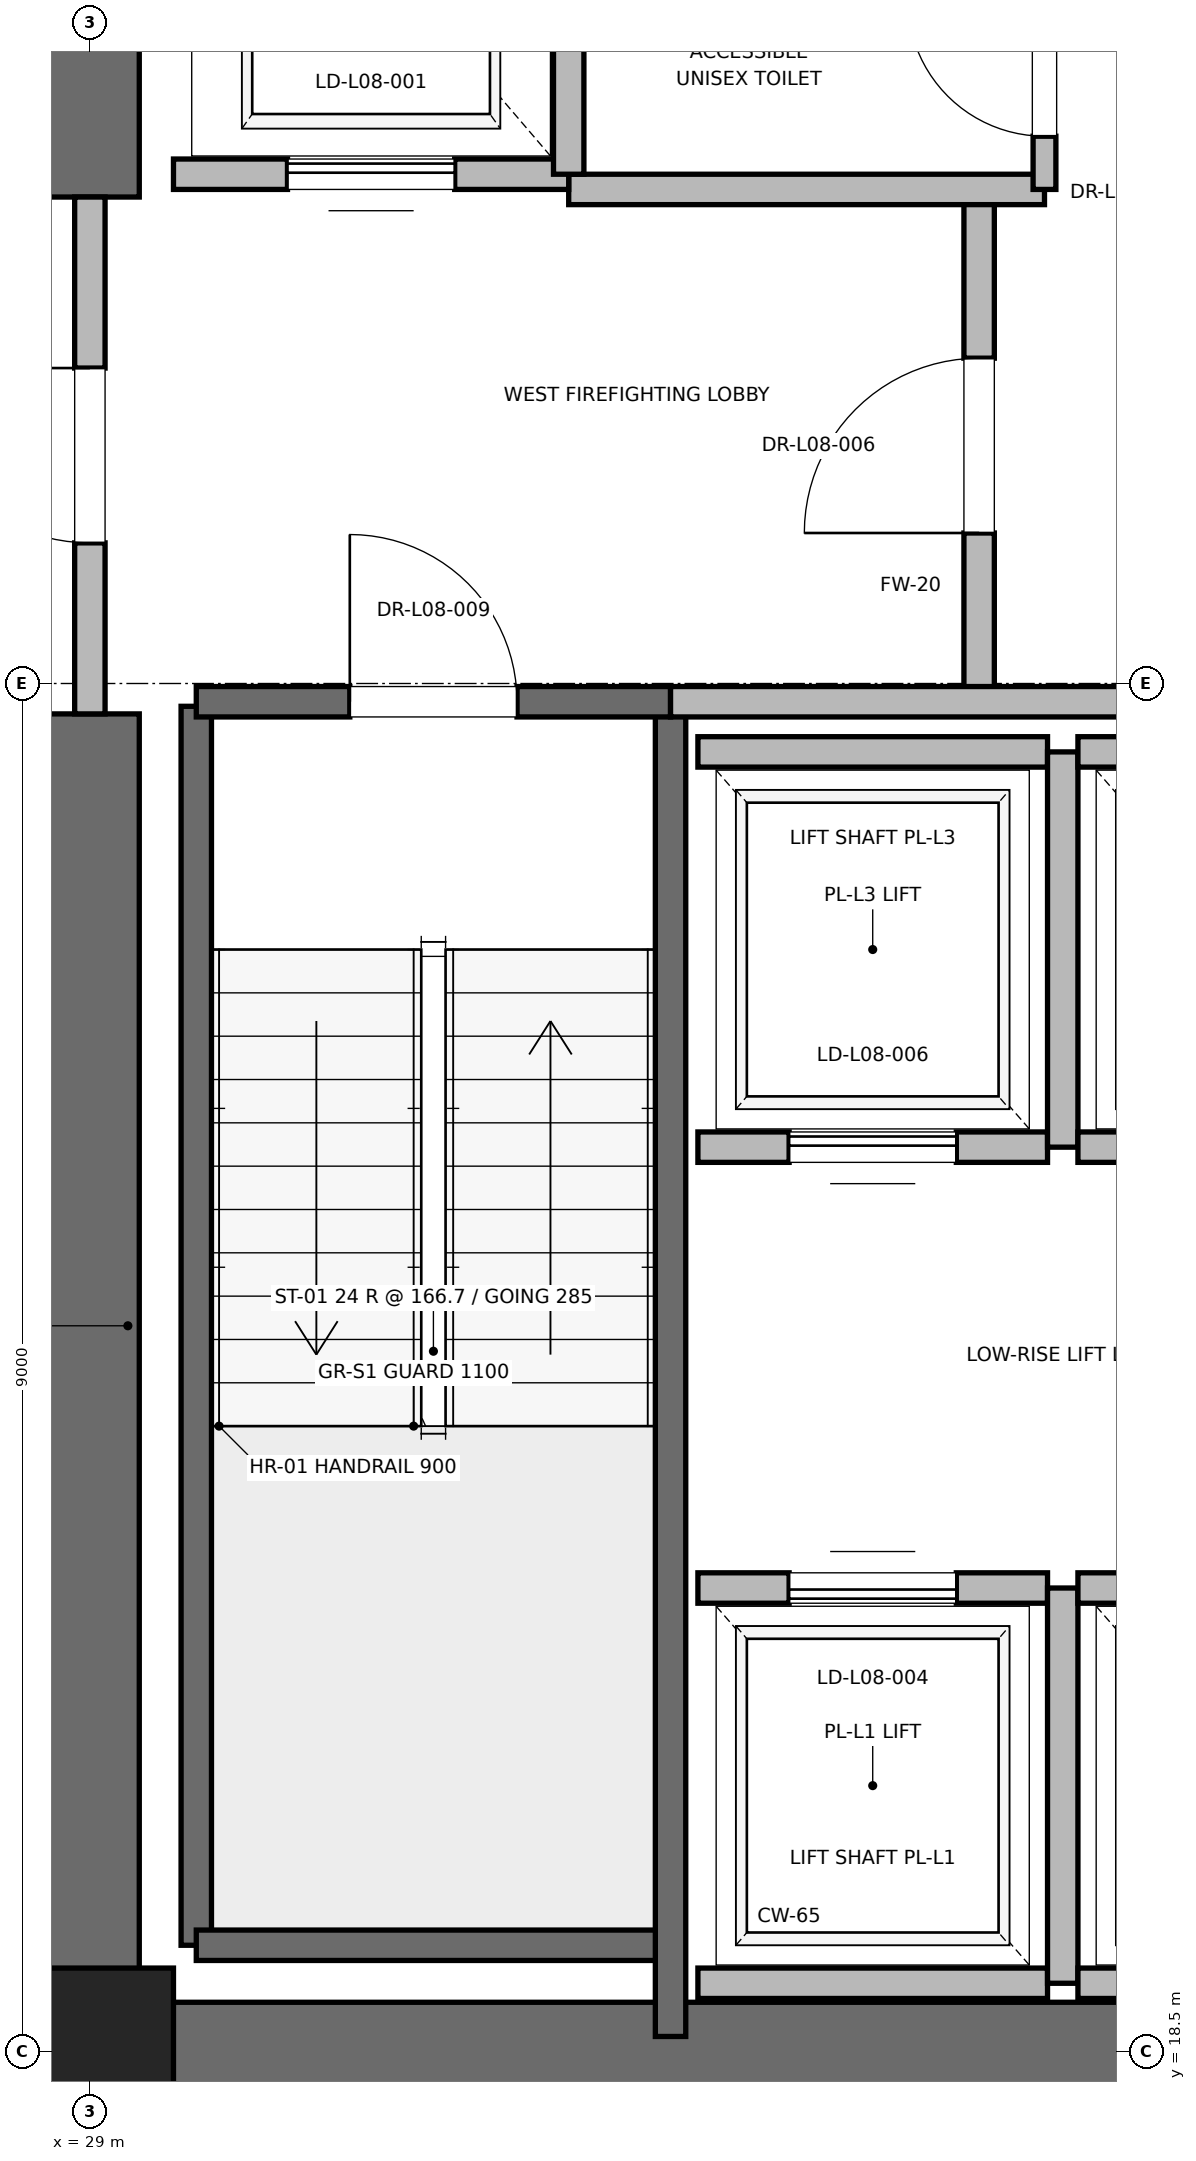
"""IFC4 building model, lengths in metres.
Left out: names, types, materials, properties, quantities, classifications, styles, units other than length and angle.
Written with IfcOpenShell. Run it as: python <this file> out.ifc"""

import sys

from ifc_helpers import new_model, si_unit, direction, frame, frame_2d, origin, origin_2d, place, context, subcontext, project, spatial, rectangle, extrude, element, fill, save


model = new_model("IFC4")
c1 = context("Model", 3, precision=1e-05, world=origin(), true_north=direction((0.0, 1.0)))
c2 = subcontext(c1, "Body", "Model", "MODEL_VIEW")
j1 = project(units=[si_unit("LENGTHUNIT", "METRE"), si_unit("PLANEANGLEUNIT", "RADIAN")], contexts=[c1])
p1 = place(None, origin())
s1 = spatial("IfcSite", under=j1, at=p1, CompositionType="ELEMENT")
p2 = place(p1, origin())
s2 = spatial("IfcBuilding", under=s1, at=p2, CompositionType="ELEMENT")
p3 = place(p2, frame((0.0, 0.0, 39.6)))
s3 = spatial("IfcBuildingStorey", under=s2, at=p3, CompositionType="ELEMENT", Elevation=39.6)
p4 = place(p3, frame((29.0, 18.5, 0.0), z_axis=(0.0, 0.0, 1.0), x_axis=(1.0, 0.0, 0.0)))
e1 = element("IfcColumn", 1, at=p4, inside=s3, PredefinedType="PILASTER", context=c2, shape_type="SweptSolid", body=[
    extrude(rectangle(XDim=1.1, YDim=1.1, at=origin_2d()), origin(), (0.0, 0.0, 1.0), 4.0),
])
p5 = place(p3, frame((29.0, 18.5, 0.0), z_axis=(0.0, 0.0, 1.0), x_axis=(1.0, 0.0, 0.0)))
e2 = element("IfcWall", 2, at=p5, inside=s3, PredefinedType="SHEAR", context=c2, shape_type="SweptSolid", body=[
    extrude(rectangle(XDim=9.2, YDim=0.65, at=frame_2d((4.6, 0.0))), origin(), (0.0, 0.0, 1.0), 3.76),
])
p6 = place(p3, frame((29.0, 18.5, 0.0), z_axis=(0.0, 0.0, 1.0), x_axis=(0.0, 1.0, 0.0)))
e3 = element("IfcWall", 3, at=p6, inside=s3, PredefinedType="SHEAR", context=c2, shape_type="SweptSolid", body=[
    extrude(rectangle(XDim=8.8, YDim=0.65, at=frame_2d((4.4, 0.0))), origin(), (0.0, 0.0, 1.0), 3.76),
])
p7 = place(p3, frame((29.0, 30.7, 0.0), z_axis=(0.0, 0.0, 1.0), x_axis=(0.0, 1.0, 0.0)))
e4 = element("IfcWall", 4, at=p7, inside=s3, PredefinedType="SHEAR", context=c2, shape_type="SweptSolid", body=[
    extrude(rectangle(XDim=5.8, YDim=0.65, at=frame_2d((2.9, 0.0))), origin(), (0.0, 0.0, 1.0), 3.76),
])
p8 = place(p3, frame((29.7, 19.2, 0.0), z_axis=(0.0, 0.0, 1.0), x_axis=(0.0, 1.0, 0.0)))
e5 = element("IfcWall", 5, at=p8, inside=s3, PredefinedType="SOLIDWALL", context=c2, shape_type="SweptSolid", body=[
    extrude(rectangle(XDim=8.15, YDim=0.2, at=frame_2d((4.075, 0.0))), origin(), (0.0, 0.0, 1.0), 3.76),
])
p9 = place(p3, frame((29.7, 19.2, 0.0), z_axis=(0.0, 0.0, 1.0), x_axis=(1.0, 0.0, 0.0)))
e6 = element("IfcWall", 6, at=p9, inside=s3, PredefinedType="SOLIDWALL", context=c2, shape_type="SweptSolid", body=[
    extrude(rectangle(XDim=3.12, YDim=0.2, at=frame_2d((1.56, 0.0))), origin(), (0.0, 0.0, 1.0), 3.76),
])
p10 = place(p3, frame((32.82, 18.6, 0.0), z_axis=(0.0, 0.0, 1.0), x_axis=(0.0, 1.0, 0.0)))
e7 = element("IfcWall", 7, at=p10, inside=s3, PredefinedType="SOLIDWALL", context=c2, shape_type="SweptSolid", body=[
    extrude(rectangle(XDim=8.78, YDim=0.2, at=frame_2d((4.39, 0.0))), origin(), (0.0, 0.0, 1.0), 3.76),
])
p11 = place(p3, frame((29.7, 27.38, 0.0), z_axis=(0.0, 0.0, 1.0), x_axis=(1.0, 0.0, 0.0)))
e8 = element("IfcWall", 8, at=p11, inside=s3, PredefinedType="SOLIDWALL", context=c2, shape_type="SweptSolid", body=[
    extrude(rectangle(XDim=3.12, YDim=0.2, at=frame_2d((1.56, 0.0))), origin(), (0.0, 0.0, 1.0), 3.76),
])
p12 = place(p11, frame((1.01, 0.0, 0.0)))
e9 = element("IfcOpeningElement", 9, at=p12, cuts=e8, PredefinedType="OPENING", context=c2, shape_type="SweptSolid", body=[
    extrude(rectangle(XDim=1.1, YDim=2.15, at=frame_2d((0.55, 1.075))), frame((0.0, 0.1, 0.0), z_axis=(0.0, -1.0, 0.0), x_axis=(1.0, 0.0, 0.0)), (0.0, 0.0, 1.0), 0.2),
])
p13 = place(p3, frame((34.85, 27.38, 0.0), z_axis=(0.0, 0.0, 1.0), x_axis=(0.0, 1.0, 0.0)))
e10 = element("IfcWall", 10, at=p13, inside=s3, PredefinedType="PARTITIONING", context=c2, shape_type="SweptSolid", body=[
    extrude(rectangle(XDim=3.37, YDim=0.2, at=frame_2d((1.685, 0.0))), origin(), (0.0, 0.0, 1.0), 3.76),
])
p14 = place(p13, frame((1.11, 0.0, 0.0)))
e11 = element("IfcOpeningElement", 11, at=p14, cuts=e10, PredefinedType="OPENING", context=c2, shape_type="SweptSolid", body=[
    extrude(rectangle(XDim=1.15, YDim=2.2, at=frame_2d((0.575, 1.1))), frame((0.0, 0.1, 0.0), z_axis=(0.0, -1.0, 0.0), x_axis=(1.0, 0.0, 0.0)), (0.0, 0.0, 1.0), 0.2),
])
p15 = place(p3, frame((29.0, 27.3, 0.0), z_axis=(0.0, 0.0, 1.0), x_axis=(0.0, 1.0, 0.0)))
e12 = element("IfcWall", 12, at=p15, inside=s3, PredefinedType="PARTITIONING", context=c2, shape_type="SweptSolid", body=[
    extrude(rectangle(XDim=3.4, YDim=0.2, at=frame_2d((1.7, 0.0))), origin(), (0.0, 0.0, 1.0), 2.54),
])
p16 = place(p15, frame((1.125, 0.0, 0.0)))
e13 = element("IfcOpeningElement", 13, at=p16, cuts=e12, PredefinedType="OPENING", context=c2, shape_type="SweptSolid", body=[
    extrude(rectangle(XDim=1.15, YDim=2.2, at=frame_2d((0.575, 1.1))), frame((0.0, 0.1, 0.0), z_axis=(0.0, -1.0, 0.0), x_axis=(1.0, 0.0, 0.0)), (0.0, 0.0, 1.0), 0.2),
])
p17 = place(p3, frame((32.82, 27.38, 0.0), z_axis=(0.0, 0.0, 1.0), x_axis=(1.0, 0.0, 0.0)))
e14 = element("IfcWall", 14, at=p17, inside=s3, PredefinedType="PARTITIONING", context=c2, shape_type="SweptSolid", body=[
    extrude(rectangle(XDim=5.62, YDim=0.2, at=frame_2d((2.81, 0.0))), origin(), (0.0, 0.0, 1.0), 3.76),
])
p18 = place(p3, frame((32.15, 30.75, 0.0), z_axis=(0.0, 0.0, 1.0), x_axis=(1.0, 0.0, 0.0)))
e15 = element("IfcWall", 15, at=p18, inside=s3, PredefinedType="PARTITIONING", context=c2, shape_type="SweptSolid", body=[
    extrude(rectangle(XDim=3.13, YDim=0.2, at=frame_2d((1.565, 0.0))), origin(), (0.0, 0.0, 1.0), 3.76),
])
p19 = place(p3, frame((29.55, 30.85, 0.0), z_axis=(0.0, 0.0, 1.0), x_axis=(1.0, 0.0, 0.0)))
e16 = element("IfcWall", 16, at=p19, inside=s3, PredefinedType="SOLIDWALL", context=c2, shape_type="SweptSolid", body=[
    extrude(rectangle(XDim=2.6, YDim=0.2, at=frame_2d((1.3, 0.0))), origin(), (0.0, 0.0, 1.0), 2.54),
])
p20 = place(p19, frame((0.75, 0.0, 0.0)))
e17 = element("IfcOpeningElement", 17, at=p20, cuts=e16, PredefinedType="OPENING", context=c2, shape_type="SweptSolid", body=[
    extrude(rectangle(XDim=1.1, YDim=2.2, at=frame_2d((0.55, 1.1))), frame((0.0, 0.1, 0.0), z_axis=(0.0, -1.0, 0.0), x_axis=(1.0, 0.0, 0.0)), (0.0, 0.0, 1.0), 0.2),
])
p21 = place(p3, frame((32.15, 30.85, 0.0), z_axis=(0.0, 0.0, 1.0), x_axis=(0.0, 1.0, 0.0)))
e18 = element("IfcWall", 18, at=p21, inside=s3, PredefinedType="SOLIDWALL", context=c2, shape_type="SweptSolid", body=[
    extrude(rectangle(XDim=3.0, YDim=0.2, at=frame_2d((1.5, 0.0))), origin(), (0.0, 0.0, 1.0), 3.76),
])
p22 = place(p3, frame((33.0, 18.95, 0.0), z_axis=(0.0, 0.0, 1.0), x_axis=(1.0, 0.0, 0.0)))
e19 = element("IfcWall", 19, at=p22, inside=s3, PredefinedType="SOLIDWALL", context=c2, shape_type="SweptSolid", body=[
    extrude(rectangle(XDim=2.3, YDim=0.2, at=frame_2d((1.15, 0.0))), origin(), (0.0, 0.0, 1.0), 3.76),
])
p23 = place(p3, frame((35.3, 21.55, 0.0), z_axis=(0.0, 0.0, 1.0), x_axis=(-1.0, 0.0, 0.0)))
e20 = element("IfcWall", 20, at=p23, inside=s3, PredefinedType="SOLIDWALL", context=c2, shape_type="SweptSolid", body=[
    extrude(rectangle(XDim=2.3, YDim=0.2, at=frame_2d((1.15, 0.0))), origin(), (0.0, 0.0, 1.0), 3.76),
])
p24 = place(p23, frame((0.6, 0.0, 0.0)))
e21 = element("IfcOpeningElement", 21, at=p24, cuts=e20, PredefinedType="OPENING", context=c2, shape_type="SweptSolid", body=[
    extrude(rectangle(XDim=1.1, YDim=2.2, at=frame_2d((0.55, 1.1))), frame((0.0, 0.1, 0.0), z_axis=(0.0, -1.0, 0.0), x_axis=(1.0, 0.0, 0.0)), (0.0, 0.0, 1.0), 0.2),
])
p25 = place(p3, frame((35.4, 18.95, 0.0), z_axis=(0.0, 0.0, 1.0), x_axis=(0.0, 1.0, 0.0)))
e22 = element("IfcWall", 22, at=p25, inside=s3, PredefinedType="SOLIDWALL", context=c2, shape_type="SweptSolid", body=[
    extrude(rectangle(XDim=2.6, YDim=0.2, at=frame_2d((1.3, 0.0))), origin(), (0.0, 0.0, 1.0), 3.76),
])
p26 = place(p3, frame((35.5, 18.95, 0.0), z_axis=(0.0, 0.0, 1.0), x_axis=(1.0, 0.0, 0.0)))
e23 = element("IfcWall", 23, at=p26, inside=s3, PredefinedType="SOLIDWALL", context=c2, shape_type="SweptSolid", body=[
    extrude(rectangle(XDim=2.3, YDim=0.2, at=frame_2d((1.15, 0.0))), origin(), (0.0, 0.0, 1.0), 2.54),
])
p27 = place(p3, frame((37.8, 21.55, 0.0), z_axis=(0.0, 0.0, 1.0), x_axis=(-1.0, 0.0, 0.0)))
e24 = element("IfcWall", 24, at=p27, inside=s3, PredefinedType="SOLIDWALL", context=c2, shape_type="SweptSolid", body=[
    extrude(rectangle(XDim=2.3, YDim=0.2, at=frame_2d((1.15, 0.0))), origin(), (0.0, 0.0, 1.0), 3.76),
])
p28 = place(p27, frame((0.6, 0.0, 0.0)))
e25 = element("IfcOpeningElement", 25, at=p28, cuts=e24, PredefinedType="OPENING", context=c2, shape_type="SweptSolid", body=[
    extrude(rectangle(XDim=1.1, YDim=2.2, at=frame_2d((0.55, 1.1))), frame((0.0, 0.1, 0.0), z_axis=(0.0, -1.0, 0.0), x_axis=(1.0, 0.0, 0.0)), (0.0, 0.0, 1.0), 0.2),
])
p29 = place(p3, frame((33.0, 24.45, 0.0), z_axis=(0.0, 0.0, 1.0), x_axis=(1.0, 0.0, 0.0)))
e26 = element("IfcWall", 26, at=p29, inside=s3, PredefinedType="SOLIDWALL", context=c2, shape_type="SweptSolid", body=[
    extrude(rectangle(XDim=2.3, YDim=0.2, at=frame_2d((1.15, 0.0))), origin(), (0.0, 0.0, 1.0), 3.76),
])
p30 = place(p29, frame((0.6, 0.0, 0.0)))
e27 = element("IfcOpeningElement", 27, at=p30, cuts=e26, PredefinedType="OPENING", context=c2, shape_type="SweptSolid", body=[
    extrude(rectangle(XDim=1.1, YDim=2.2, at=frame_2d((0.55, 1.1))), frame((0.0, 0.1, 0.0), z_axis=(0.0, -1.0, 0.0), x_axis=(1.0, 0.0, 0.0)), (0.0, 0.0, 1.0), 0.2),
])
p31 = place(p3, frame((35.3, 27.05, 0.0), z_axis=(0.0, 0.0, 1.0), x_axis=(-1.0, 0.0, 0.0)))
e28 = element("IfcWall", 28, at=p31, inside=s3, PredefinedType="SOLIDWALL", context=c2, shape_type="SweptSolid", body=[
    extrude(rectangle(XDim=2.3, YDim=0.2, at=frame_2d((1.15, 0.0))), origin(), (0.0, 0.0, 1.0), 3.76),
])
p32 = place(p3, frame((35.4, 24.45, 0.0), z_axis=(0.0, 0.0, 1.0), x_axis=(0.0, 1.0, 0.0)))
e29 = element("IfcWall", 29, at=p32, inside=s3, PredefinedType="SOLIDWALL", context=c2, shape_type="SweptSolid", body=[
    extrude(rectangle(XDim=2.6, YDim=0.2, at=frame_2d((1.3, 0.0))), origin(), (0.0, 0.0, 1.0), 3.76),
])
p33 = place(p3, frame((35.5, 24.45, 0.0), z_axis=(0.0, 0.0, 1.0), x_axis=(1.0, 0.0, 0.0)))
e30 = element("IfcWall", 30, at=p33, inside=s3, PredefinedType="SOLIDWALL", context=c2, shape_type="SweptSolid", body=[
    extrude(rectangle(XDim=2.3, YDim=0.2, at=frame_2d((1.15, 0.0))), origin(), (0.0, 0.0, 1.0), 3.76),
])
p34 = place(p33, frame((0.6, 0.0, 0.0)))
e31 = element("IfcOpeningElement", 31, at=p34, cuts=e30, PredefinedType="OPENING", context=c2, shape_type="SweptSolid", body=[
    extrude(rectangle(XDim=1.1, YDim=2.2, at=frame_2d((0.55, 1.1))), frame((0.0, 0.1, 0.0), z_axis=(0.0, -1.0, 0.0), x_axis=(1.0, 0.0, 0.0)), (0.0, 0.0, 1.0), 0.2),
])
p35 = place(p3, frame((37.8, 27.05, 0.0), z_axis=(0.0, 0.0, 1.0), x_axis=(-1.0, 0.0, 0.0)))
e32 = element("IfcWall", 32, at=p35, inside=s3, PredefinedType="SOLIDWALL", context=c2, shape_type="SweptSolid", body=[
    extrude(rectangle(XDim=2.3, YDim=0.2, at=frame_2d((1.15, 0.0))), origin(), (0.0, 0.0, 1.0), 3.76),
])
p36 = place(p3, frame((35.28, 30.75, 0.0), z_axis=(0.0, 0.0, 1.0), x_axis=(0.0, 1.0, 0.0)))
e33 = element("IfcWall", 33, at=p36, inside=s3, PredefinedType="PARTITIONING", context=c2, shape_type="SweptSolid", body=[
    extrude(rectangle(XDim=1.6, YDim=0.15, at=frame_2d((0.8, 0.0))), origin(), (0.0, 0.0, 1.0), 2.85),
])
p37 = place(p36, frame((0.35, 0.0, 0.0)))
e34 = element("IfcOpeningElement", 34, at=p37, cuts=e33, PredefinedType="OPENING", context=c2, shape_type="SweptSolid", body=[
    extrude(rectangle(XDim=0.9, YDim=2.1, at=frame_2d((0.45, 1.05))), frame((0.0, 0.075, 0.0), z_axis=(0.0, -1.0, 0.0), x_axis=(1.0, 0.0, 0.0)), (0.0, 0.0, 1.0), 0.15),
])
p38 = place(p12, origin())
e35 = element("IfcDoor", 35, at=p38, inside=s3, OperationType="SINGLE_SWING_LEFT", PredefinedType="DOOR", context=c2, shape_type="SweptSolid", body=[
    extrude(rectangle(XDim=1.1, YDim=2.15, at=frame_2d((0.55, 1.075))), frame((0.0, 0.025, 0.0), z_axis=(0.0, -1.0, 0.0), x_axis=(1.0, 0.0, 0.0)), (0.0, 0.0, 1.0), 0.05),
])
fill(e9, e35)
p39 = place(p14, origin())
e36 = element("IfcDoor", 36, at=p39, inside=s3, OperationType="SINGLE_SWING_LEFT", PredefinedType="DOOR", context=c2, shape_type="SweptSolid", body=[
    extrude(rectangle(XDim=1.15, YDim=2.2, at=frame_2d((0.575, 1.1))), frame((0.0, 0.025, 0.0), z_axis=(0.0, -1.0, 0.0), x_axis=(1.0, 0.0, 0.0)), (0.0, 0.0, 1.0), 0.05),
])
fill(e11, e36)
p40 = place(p16, origin())
e37 = element("IfcDoor", 37, at=p40, inside=s3, OperationType="SINGLE_SWING_RIGHT", PredefinedType="DOOR", context=c2, shape_type="SweptSolid", body=[
    extrude(rectangle(XDim=1.15, YDim=2.2, at=frame_2d((0.575, 1.1))), frame((0.0, 0.025, 0.0), z_axis=(0.0, -1.0, 0.0), x_axis=(1.0, 0.0, 0.0)), (0.0, 0.0, 1.0), 0.05),
])
fill(e13, e37)
p41 = place(p20, origin())
e38 = element("IfcDoor", 38, at=p41, inside=s3, OperationType="SLIDING_TO_RIGHT", PredefinedType="DOOR", context=c2, shape_type="SweptSolid", body=[
    extrude(rectangle(XDim=1.1, YDim=2.2, at=frame_2d((0.55, 1.1))), frame((0.0, 0.025, 0.0), z_axis=(0.0, -1.0, 0.0), x_axis=(1.0, 0.0, 0.0)), (0.0, 0.0, 1.0), 0.05),
])
fill(e17, e38)
p42 = place(p24, origin())
e39 = element("IfcDoor", 39, at=p42, inside=s3, OperationType="SLIDING_TO_RIGHT", PredefinedType="DOOR", context=c2, shape_type="SweptSolid", body=[
    extrude(rectangle(XDim=1.1, YDim=2.2, at=frame_2d((0.55, 1.1))), frame((0.0, 0.025, 0.0), z_axis=(0.0, -1.0, 0.0), x_axis=(1.0, 0.0, 0.0)), (0.0, 0.0, 1.0), 0.05),
])
fill(e21, e39)
p43 = place(p30, origin())
e40 = element("IfcDoor", 40, at=p43, inside=s3, OperationType="SLIDING_TO_RIGHT", PredefinedType="DOOR", context=c2, shape_type="SweptSolid", body=[
    extrude(rectangle(XDim=1.1, YDim=2.2, at=frame_2d((0.55, 1.1))), frame((0.0, 0.025, 0.0), z_axis=(0.0, -1.0, 0.0), x_axis=(1.0, 0.0, 0.0)), (0.0, 0.0, 1.0), 0.05),
])
fill(e27, e40)
p44 = place(p37, origin())
e41 = element("IfcDoor", 41, at=p44, inside=s3, OperationType="SINGLE_SWING_RIGHT", PredefinedType="DOOR", context=c2, shape_type="SweptSolid", body=[
    extrude(rectangle(XDim=0.9, YDim=2.1, at=frame_2d((0.45, 1.05))), frame((0.0, 0.025, 0.0), z_axis=(0.0, -1.0, 0.0), x_axis=(1.0, 0.0, 0.0)), (0.0, 0.0, 1.0), 0.05),
])
fill(e34, e41)
save(model, sys.argv[1])
